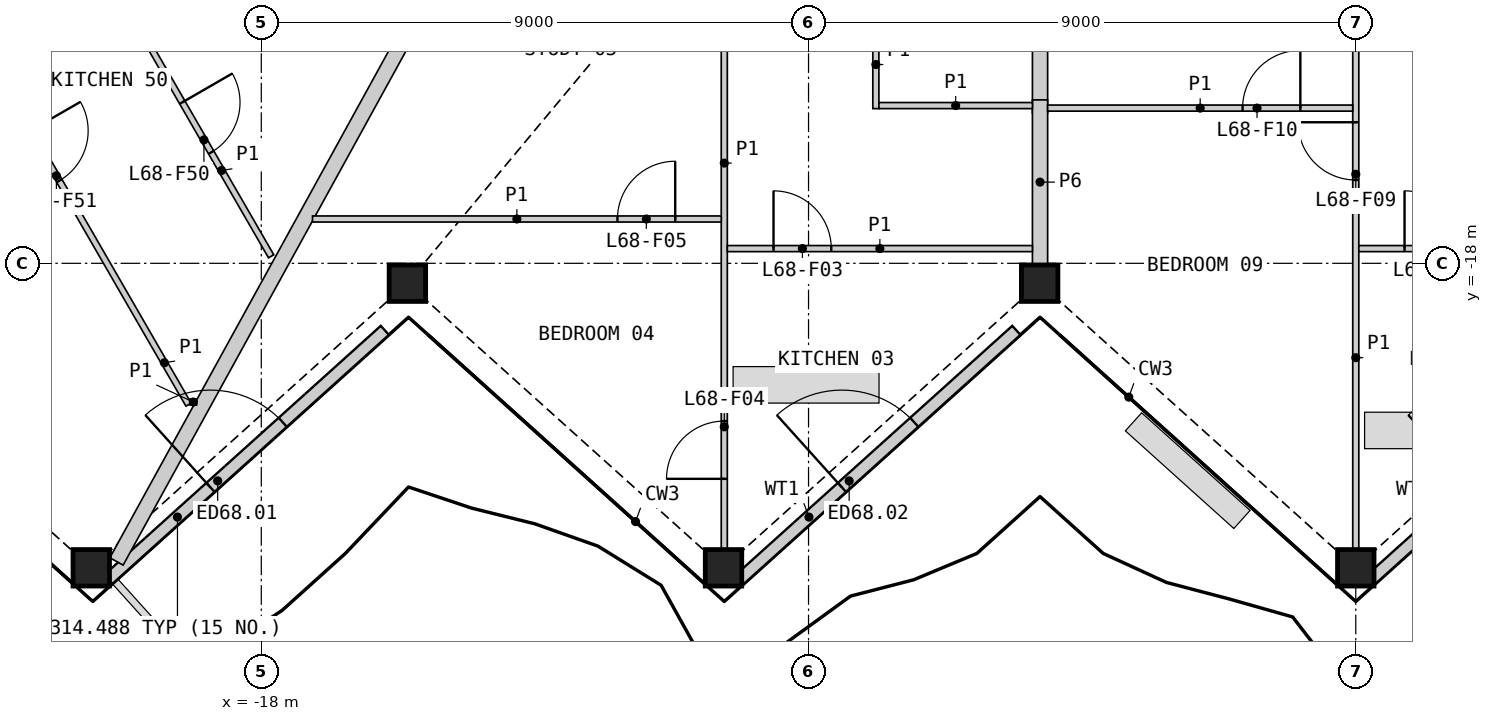
"""IFC4 building model, lengths in metres.
Left out: names, types, materials, properties, quantities, classifications, styles, units other than length and angle.
Written with IfcOpenShell. Run it as: python <this file> out.ifc"""

import sys

from ifc_helpers import new_model, si_unit, direction, frame, frame_2d, origin, origin_2d, place, context, subcontext, project, spatial, rectangle, hollow_rectangle, extrude, element, fill, save


model = new_model("IFC4")
c1 = context("Model", 3, precision=1e-05, world=origin(), true_north=direction((0.0, 1.0)))
c2 = subcontext(c1, "Body", "Model", "MODEL_VIEW")
j1 = project(units=[si_unit("LENGTHUNIT", "METRE"), si_unit("PLANEANGLEUNIT", "RADIAN")], contexts=[c1])
p1 = place(None, origin())
s1 = spatial("IfcSite", under=j1, at=p1, CompositionType="ELEMENT")
p2 = place(p1, origin())
s2 = spatial("IfcBuilding", under=s1, at=p2, CompositionType="ELEMENT")
p3 = place(p2, frame((0.0, 0.0, 312.0)))
s3 = spatial("IfcBuildingStorey", under=s2, at=p3, CompositionType="ELEMENT", Elevation=312.0)
for number, where, z_axis, x_axis in (
    (1, (-20.796, -23.008, 0.0), (0.0, 0.0, 1.0), (1.0, 0.0, 0.0)),
    (2, (-15.597, -18.327, 0.0), (0.0, 0.0, 1.0), (1.0, 0.0, 0.0)),
    (3, (-10.398, -23.008, 0.0), (0.0, 0.0, 1.0), (1.0, 0.0, 0.0)),
    (4, (-5.199, -18.327, 0.0), (0.0, 0.0, 1.0), (1.0, 0.0, 0.0)),
    (5, (0.0, -23.008, 0.0), (0.0, 0.0, 1.0), (1.0, 0.0, 0.0)),
):
    element("IfcColumn", number, at=place(p3, frame(where, z_axis=z_axis, x_axis=x_axis)), inside=s3, PredefinedType="COLUMN", context=c2, shape_type="SweptSolid", body=[
        extrude(hollow_rectangle(XDim=0.6, YDim=0.6, WallThickness=0.04, at=origin_2d()), origin(), (0.0, 0.0, 1.0), 3.4),
    ])
p4 = place(p3, frame((-20.516, -23.198, 0.0), z_axis=(0.0, 0.0, 1.0), x_axis=(0.743121537674, 0.66915646918, 0.0)))
e6 = element("IfcWall", 6, at=p4, inside=s3, PredefinedType="SOLIDWALL", context=c2, shape_type="SweptSolid", body=[
    extrude(rectangle(XDim=6.12, YDim=0.2, at=frame_2d((3.06, 0.0))), origin(), (0.0, 0.0, 1.0), 2.488),
])
p5 = place(p4, frame((2.26, 0.0, 0.0)))
e7 = element("IfcOpeningElement", 7, at=p5, cuts=e6, PredefinedType="OPENING", context=c2, shape_type="SweptSolid", body=[
    extrude(rectangle(XDim=1.6, YDim=2.25, at=frame_2d((0.8, 1.125))), frame((0.0, 0.11, 0.0), z_axis=(0.0, -1.0, 0.0), x_axis=(1.0, 0.0, 0.0)), (0.0, 0.0, 1.0), 0.22),
])
p6 = place(p3, frame((-10.13, -23.198, 0.0), z_axis=(0.0, 0.0, 1.0), x_axis=(0.743139400616, 0.669136631229, 0.0)))
e8 = element("IfcWall", 8, at=p6, inside=s3, PredefinedType="SOLIDWALL", context=c2, shape_type="SweptSolid", body=[
    extrude(rectangle(XDim=6.12, YDim=0.2, at=frame_2d((3.06, 0.0))), origin(), (0.0, 0.0, 1.0), 2.488),
])
p7 = place(p6, frame((2.26, 0.0, 0.0)))
e9 = element("IfcOpeningElement", 9, at=p7, cuts=e8, PredefinedType="OPENING", context=c2, shape_type="SweptSolid", body=[
    extrude(rectangle(XDim=1.6, YDim=2.25, at=frame_2d((0.8, 1.125))), frame((0.0, 0.11, 0.0), z_axis=(0.0, -1.0, 0.0), x_axis=(1.0, 0.0, 0.0)), (0.0, 0.0, 1.0), 0.22),
])
p8 = place(p3, frame((0.256, -23.198, 0.0), z_axis=(0.0, 0.0, 1.0), x_axis=(0.743139400616, 0.669136631229, 0.0)))
e10 = element("IfcWall", 10, at=p8, inside=s3, PredefinedType="SOLIDWALL", context=c2, shape_type="SweptSolid", body=[
    extrude(rectangle(XDim=6.12, YDim=0.2, at=frame_2d((3.06, 0.0))), origin(), (0.0, 0.0, 1.0), 2.488),
])
p9 = place(p8, frame((2.26, 0.0, 0.0)))
e11 = element("IfcOpeningElement", 11, at=p9, cuts=e10, PredefinedType="OPENING", context=c2, shape_type="SweptSolid", body=[
    extrude(rectangle(XDim=1.6, YDim=2.25, at=frame_2d((0.8, 1.125))), frame((0.0, 0.11, 0.0), z_axis=(0.0, -1.0, 0.0), x_axis=(1.0, 0.0, 0.0)), (0.0, 0.0, 1.0), 0.22),
])
p10 = place(p3, frame((-20.381, -22.904, 0.0), z_axis=(0.0, 0.0, 1.0), x_axis=(0.481994550341, 0.876174214093, 0.0)))
e12 = element("IfcWall", 12, at=p10, inside=s3, PredefinedType="PARTITIONING", context=c2, shape_type="SweptSolid", body=[
    extrude(rectangle(XDim=14.96, YDim=0.25, at=frame_2d((7.48, 0.0))), origin(), (0.0, 0.0, 1.0), 2.33),
])
p11 = place(p3, frame((-5.193, -15.531, 0.0), z_axis=(0.0, 0.0, 1.0), x_axis=(0.0, 1.0, 0.0)))
e13 = element("IfcWall", 13, at=p11, inside=s3, PredefinedType="PARTITIONING", context=c2, shape_type="SweptSolid", body=[
    extrude(rectangle(XDim=5.525, YDim=0.25, at=frame_2d((2.762, 0.0))), origin(), (0.0, 0.0, 1.0), 2.33),
])
p12 = place(p3, frame((-5.193, -18.017, 0.0), z_axis=(0.0, 0.0, 1.0), x_axis=(0.0, 1.0, 0.0)))
e14 = element("IfcWall", 14, at=p12, inside=s3, PredefinedType="PARTITIONING", context=c2, shape_type="SweptSolid", body=[
    extrude(rectangle(XDim=2.705, YDim=0.25, at=frame_2d((1.352, 0.0))), origin(), (0.0, 0.0, 1.0), 2.33),
])
p13 = place(p3, frame((-10.385, -22.698, 0.0), z_axis=(0.0, 0.0, 1.0), x_axis=(0.0, 1.0, 0.0)))
e15 = element("IfcWall", 15, at=p13, inside=s3, PredefinedType="PARTITIONING", context=c2, shape_type="SweptSolid", body=[
    extrude(rectangle(XDim=12.692, YDim=0.1, at=frame_2d((6.346, 0.0))), origin(), (0.0, 0.0, 1.0), 2.33),
])
p14 = place(p13, frame((1.153, 0.0, 0.0)))
e16 = element("IfcOpeningElement", 16, at=p14, cuts=e15, PredefinedType="OPENING", context=c2, shape_type="SweptSolid", body=[
    extrude(rectangle(XDim=0.95, YDim=2.1, at=frame_2d((0.475, 1.05))), frame((0.0, 0.06, 0.0), z_axis=(0.0, -1.0, 0.0), x_axis=(1.0, 0.0, 0.0)), (0.0, 0.0, 1.0), 0.12),
])
p15 = place(p3, frame((0.0, -22.698, 0.0), z_axis=(0.0, 0.0, 1.0), x_axis=(0.0, 1.0, 0.0)))
e17 = element("IfcWall", 17, at=p15, inside=s3, PredefinedType="PARTITIONING", context=c2, shape_type="SweptSolid", body=[
    extrude(rectangle(XDim=12.585, YDim=0.1, at=frame_2d((6.292, 0.0))), origin(), (0.0, 0.0, 1.0), 2.33),
])
p16 = place(p15, frame((6.068, 0.0, 0.0)))
e18 = element("IfcOpeningElement", 18, at=p16, cuts=e17, PredefinedType="OPENING", context=c2, shape_type="SweptSolid", body=[
    extrude(rectangle(XDim=0.95, YDim=2.1, at=frame_2d((0.475, 1.05))), frame((0.0, 0.06, 0.0), z_axis=(0.0, -1.0, 0.0), x_axis=(1.0, 0.0, 0.0)), (0.0, 0.0, 1.0), 0.12),
])
p17 = place(p3, frame((-27.122, -15.659, 0.0), z_axis=(0.0, 0.0, 1.0), x_axis=(0.866021046153, 0.500007547564, 0.0)))
e19 = element("IfcWall", 19, at=p17, inside=s3, PredefinedType="PARTITIONING", context=c2, shape_type="SweptSolid", body=[
    extrude(rectangle(XDim=11.267, YDim=0.1, at=frame_2d((5.634, 0.0))), origin(), (0.0, 0.0, 1.0), 2.33),
])
p18 = place(p17, frame((1.452, 0.0, 0.0)))
e20 = element("IfcOpeningElement", 20, at=p18, cuts=e19, PredefinedType="OPENING", context=c2, shape_type="SweptSolid", body=[
    extrude(rectangle(XDim=0.95, YDim=2.1, at=frame_2d((0.475, 1.05))), frame((0.0, 0.06, 0.0), z_axis=(0.0, -1.0, 0.0), x_axis=(1.0, 0.0, 0.0)), (0.0, 0.0, 1.0), 0.12),
])
p19 = place(p3, frame((0.05, -17.758, 0.0), z_axis=(0.0, 0.0, 1.0), x_axis=(1.0, 0.0, 0.0)))
e21 = element("IfcWall", 21, at=p19, inside=s3, PredefinedType="PARTITIONING", context=c2, shape_type="SweptSolid", body=[
    extrude(rectangle(XDim=10.286, YDim=0.1, at=frame_2d((5.143, 0.0))), origin(), (0.0, 0.0, 1.0), 2.33),
])
p20 = place(p19, frame((0.752, 0.0, 0.0)))
e22 = element("IfcOpeningElement", 22, at=p20, cuts=e21, PredefinedType="OPENING", context=c2, shape_type="SweptSolid", body=[
    extrude(rectangle(XDim=0.95, YDim=2.1, at=frame_2d((0.475, 1.05))), frame((0.0, 0.06, 0.0), z_axis=(0.0, -1.0, 0.0), x_axis=(1.0, 0.0, 0.0)), (0.0, 0.0, 1.0), 0.12),
])
p21 = place(p19, frame((8.584, 0.0, 0.0)))
e23 = element("IfcOpeningElement", 23, at=p21, cuts=e21, PredefinedType="OPENING", context=c2, shape_type="SweptSolid", body=[
    extrude(rectangle(XDim=0.95, YDim=2.1, at=frame_2d((0.475, 1.05))), frame((0.0, 0.06, 0.0), z_axis=(0.0, -1.0, 0.0), x_axis=(1.0, 0.0, 0.0)), (0.0, 0.0, 1.0), 0.12),
])
p22 = place(p3, frame((-23.173, -13.437, 0.0), z_axis=(0.0, 0.0, 1.0), x_axis=(0.500018284498, -0.866014846967, 0.0)))
e24 = element("IfcWall", 24, at=p22, inside=s3, PredefinedType="PARTITIONING", context=c2, shape_type="SweptSolid", body=[
    extrude(rectangle(XDim=7.953, YDim=0.1, at=frame_2d((3.977, 0.0))), origin(), (0.0, 0.0, 1.0), 2.33),
])
p23 = place(p22, frame((2.751, 0.0, 0.0)))
e25 = element("IfcOpeningElement", 25, at=p23, cuts=e24, PredefinedType="OPENING", context=c2, shape_type="SweptSolid", body=[
    extrude(rectangle(XDim=0.95, YDim=2.1, at=frame_2d((0.475, 1.05))), frame((0.0, 0.06, 0.0), z_axis=(0.0, -1.0, 0.0), x_axis=(1.0, 0.0, 0.0)), (0.0, 0.0, 1.0), 0.12),
])
p24 = place(p3, frame((-17.158, -17.271, 0.0), z_axis=(0.0, 0.0, 1.0), x_axis=(1.0, 0.0, 0.0)))
e26 = element("IfcWall", 26, at=p24, inside=s3, PredefinedType="PARTITIONING", context=c2, shape_type="SweptSolid", body=[
    extrude(rectangle(XDim=6.722, YDim=0.1, at=frame_2d((3.361, 0.0))), origin(), (0.0, 0.0, 1.0), 2.33),
])
p25 = place(p24, frame((5.015, 0.0, 0.0)))
e27 = element("IfcOpeningElement", 27, at=p25, cuts=e26, PredefinedType="OPENING", context=c2, shape_type="SweptSolid", body=[
    extrude(rectangle(XDim=0.95, YDim=2.1, at=frame_2d((0.475, 1.05))), frame((0.0, 0.06, 0.0), z_axis=(0.0, -1.0, 0.0), x_axis=(1.0, 0.0, 0.0)), (0.0, 0.0, 1.0), 0.12),
])
p26 = place(p3, frame((-21.098, -12.239, 0.0), z_axis=(0.0, 0.0, 1.0), x_axis=(0.499973122483, -0.86604092097, 0.0)))
e28 = element("IfcWall", 28, at=p26, inside=s3, PredefinedType="PARTITIONING", context=c2, shape_type="SweptSolid", body=[
    extrude(rectangle(XDim=6.52, YDim=0.1, at=frame_2d((3.26, 0.0))), origin(), (0.0, 0.0, 1.0), 2.33),
])
p27 = place(p26, frame((3.596, 0.0, 0.0)))
e29 = element("IfcOpeningElement", 29, at=p27, cuts=e28, PredefinedType="OPENING", context=c2, shape_type="SweptSolid", body=[
    extrude(rectangle(XDim=0.95, YDim=2.1, at=frame_2d((0.475, 1.05))), frame((0.0, 0.06, 0.0), z_axis=(0.0, -1.0, 0.0), x_axis=(1.0, 0.0, 0.0)), (0.0, 0.0, 1.0), 0.12),
])
p28 = place(p3, frame((-10.336, -17.758, 0.0), z_axis=(0.0, 0.0, 1.0), x_axis=(1.0, 0.0, 0.0)))
e30 = element("IfcWall", 30, at=p28, inside=s3, PredefinedType="PARTITIONING", context=c2, shape_type="SweptSolid", body=[
    extrude(rectangle(XDim=5.018, YDim=0.1, at=frame_2d((2.509, 0.0))), origin(), (0.0, 0.0, 1.0), 2.33),
])
p29 = place(p28, frame((0.76, 0.0, 0.0)))
e31 = element("IfcOpeningElement", 31, at=p29, cuts=e30, PredefinedType="OPENING", context=c2, shape_type="SweptSolid", body=[
    extrude(rectangle(XDim=0.95, YDim=2.1, at=frame_2d((0.475, 1.05))), frame((0.0, 0.06, 0.0), z_axis=(0.0, -1.0, 0.0), x_axis=(1.0, 0.0, 0.0)), (0.0, 0.0, 1.0), 0.12),
])
p30 = place(p3, frame((-5.068, -15.447, 0.0), z_axis=(0.0, 0.0, 1.0), x_axis=(1.0, 0.0, 0.0)))
e32 = element("IfcWall", 32, at=p30, inside=s3, PredefinedType="PARTITIONING", context=c2, shape_type="SweptSolid", body=[
    extrude(rectangle(XDim=5.018, YDim=0.1, at=frame_2d((2.509, 0.0))), origin(), (0.0, 0.0, 1.0), 2.33),
])
p31 = place(p30, frame((3.206, 0.0, 0.0)))
e33 = element("IfcOpeningElement", 33, at=p31, cuts=e32, PredefinedType="OPENING", context=c2, shape_type="SweptSolid", body=[
    extrude(rectangle(XDim=0.95, YDim=2.1, at=frame_2d((0.475, 1.05))), frame((0.0, 0.06, 0.0), z_axis=(0.0, -1.0, 0.0), x_axis=(1.0, 0.0, 0.0)), (0.0, 0.0, 1.0), 0.12),
])
p32 = place(p3, frame((-7.893, -15.456, 0.0), z_axis=(0.0, 0.0, 1.0), x_axis=(0.0, 1.0, 0.0)))
e34 = element("IfcWall", 34, at=p32, inside=s3, PredefinedType="PARTITIONING", context=c2, shape_type="SweptSolid", body=[
    extrude(rectangle(XDim=2.9, YDim=0.1, at=frame_2d((1.45, 0.0))), origin(), (0.0, 0.0, 1.0), 2.33),
])
p33 = place(p32, frame((0.975, 0.0, 0.0)))
e35 = element("IfcOpeningElement", 35, at=p33, cuts=e34, PredefinedType="OPENING", context=c2, shape_type="SweptSolid", body=[
    extrude(rectangle(XDim=0.95, YDim=2.1, at=frame_2d((0.475, 1.05))), frame((0.0, 0.06, 0.0), z_axis=(0.0, -1.0, 0.0), x_axis=(1.0, 0.0, 0.0)), (0.0, 0.0, 1.0), 0.12),
])
p34 = place(p3, frame((-7.843, -15.406, 0.0), z_axis=(0.0, 0.0, 1.0), x_axis=(1.0, 0.0, 0.0)))
e36 = element("IfcWall", 36, at=p34, inside=s3, PredefinedType="PARTITIONING", context=c2, shape_type="SweptSolid", body=[
    extrude(rectangle(XDim=2.525, YDim=0.1, at=frame_2d((1.262, 0.0))), origin(), (0.0, 0.0, 1.0), 2.33),
])
p35 = place(p3, frame((-19.171, -20.281, 0.0), z_axis=(0.0, 0.0, 1.0), x_axis=(1.0, 0.0, 0.0)))
e37 = element("IfcWall", 37, at=p35, inside=s3, PredefinedType="PARTITIONING", context=c2, shape_type="SweptSolid", body=[
    extrude(rectangle(XDim=0.108, YDim=0.1, at=frame_2d((0.054, 0.0))), origin(), (0.0, 0.0, 1.0), 2.33),
])
p36 = place(p5, origin())
e38 = element("IfcDoor", 38, at=p36, inside=s3, OperationType="DOUBLE_DOOR_SINGLE_SWING", PredefinedType="DOOR", context=c2, shape_type="SweptSolid", body=[
    extrude(rectangle(XDim=1.6, YDim=2.25, at=frame_2d((0.8, 1.125))), frame((0.0, 0.025, 0.0), z_axis=(0.0, -1.0, 0.0), x_axis=(1.0, 0.0, 0.0)), (0.0, 0.0, 1.0), 0.05),
])
fill(e7, e38)
p37 = place(p7, origin())
e39 = element("IfcDoor", 39, at=p37, inside=s3, OperationType="DOUBLE_DOOR_SINGLE_SWING", PredefinedType="DOOR", context=c2, shape_type="SweptSolid", body=[
    extrude(rectangle(XDim=1.6, YDim=2.25, at=frame_2d((0.8, 1.125))), frame((0.0, 0.025, 0.0), z_axis=(0.0, -1.0, 0.0), x_axis=(1.0, 0.0, 0.0)), (0.0, 0.0, 1.0), 0.05),
])
fill(e9, e39)
p38 = place(p29, origin())
e40 = element("IfcDoor", 40, at=p38, inside=s3, OperationType="SINGLE_SWING_LEFT", PredefinedType="DOOR", context=c2, shape_type="SweptSolid", body=[
    extrude(rectangle(XDim=0.95, YDim=2.1, at=frame_2d((0.475, 1.05))), frame((0.0, 0.025, 0.0), z_axis=(0.0, -1.0, 0.0), x_axis=(1.0, 0.0, 0.0)), (0.0, 0.0, 1.0), 0.05),
])
fill(e31, e40)
p39 = place(p14, origin())
e41 = element("IfcDoor", 41, at=p39, inside=s3, OperationType="SINGLE_SWING_LEFT", PredefinedType="DOOR", context=c2, shape_type="SweptSolid", body=[
    extrude(rectangle(XDim=0.95, YDim=2.1, at=frame_2d((0.475, 1.05))), frame((0.0, 0.025, 0.0), z_axis=(0.0, -1.0, 0.0), x_axis=(1.0, 0.0, 0.0)), (0.0, 0.0, 1.0), 0.05),
])
fill(e16, e41)
p40 = place(p25, origin())
e42 = element("IfcDoor", 42, at=p40, inside=s3, OperationType="SINGLE_SWING_RIGHT", PredefinedType="DOOR", context=c2, shape_type="SweptSolid", body=[
    extrude(rectangle(XDim=0.95, YDim=2.1, at=frame_2d((0.475, 1.05))), frame((0.0, 0.025, 0.0), z_axis=(0.0, -1.0, 0.0), x_axis=(1.0, 0.0, 0.0)), (0.0, 0.0, 1.0), 0.05),
])
fill(e27, e42)
p41 = place(p20, origin())
e43 = element("IfcDoor", 43, at=p41, inside=s3, OperationType="SINGLE_SWING_LEFT", PredefinedType="DOOR", context=c2, shape_type="SweptSolid", body=[
    extrude(rectangle(XDim=0.95, YDim=2.1, at=frame_2d((0.475, 1.05))), frame((0.0, 0.025, 0.0), z_axis=(0.0, -1.0, 0.0), x_axis=(1.0, 0.0, 0.0)), (0.0, 0.0, 1.0), 0.05),
])
fill(e22, e43)
p42 = place(p16, origin())
e44 = element("IfcDoor", 44, at=p42, inside=s3, OperationType="SINGLE_SWING_RIGHT", PredefinedType="DOOR", context=c2, shape_type="SweptSolid", body=[
    extrude(rectangle(XDim=0.95, YDim=2.1, at=frame_2d((0.475, 1.05))), frame((0.0, 0.025, 0.0), z_axis=(0.0, -1.0, 0.0), x_axis=(1.0, 0.0, 0.0)), (0.0, 0.0, 1.0), 0.05),
])
fill(e18, e44)
p43 = place(p31, origin())
e45 = element("IfcDoor", 45, at=p43, inside=s3, OperationType="SINGLE_SWING_RIGHT", PredefinedType="DOOR", context=c2, shape_type="SweptSolid", body=[
    extrude(rectangle(XDim=0.95, YDim=2.1, at=frame_2d((0.475, 1.05))), frame((0.0, 0.025, 0.0), z_axis=(0.0, -1.0, 0.0), x_axis=(1.0, 0.0, 0.0)), (0.0, 0.0, 1.0), 0.05),
])
fill(e33, e45)
p44 = place(p27, origin())
e46 = element("IfcDoor", 46, at=p44, inside=s3, OperationType="SINGLE_SWING_LEFT", PredefinedType="DOOR", context=c2, shape_type="SweptSolid", body=[
    extrude(rectangle(XDim=0.95, YDim=2.1, at=frame_2d((0.475, 1.05))), frame((0.0, 0.025, 0.0), z_axis=(0.0, -1.0, 0.0), x_axis=(1.0, 0.0, 0.0)), (0.0, 0.0, 1.0), 0.05),
])
fill(e29, e46)
p45 = place(p23, origin())
e47 = element("IfcDoor", 47, at=p45, inside=s3, OperationType="SINGLE_SWING_LEFT", PredefinedType="DOOR", context=c2, shape_type="SweptSolid", body=[
    extrude(rectangle(XDim=0.95, YDim=2.1, at=frame_2d((0.475, 1.05))), frame((0.0, 0.025, 0.0), z_axis=(0.0, -1.0, 0.0), x_axis=(1.0, 0.0, 0.0)), (0.0, 0.0, 1.0), 0.05),
])
fill(e25, e47)
save(model, sys.argv[1])
